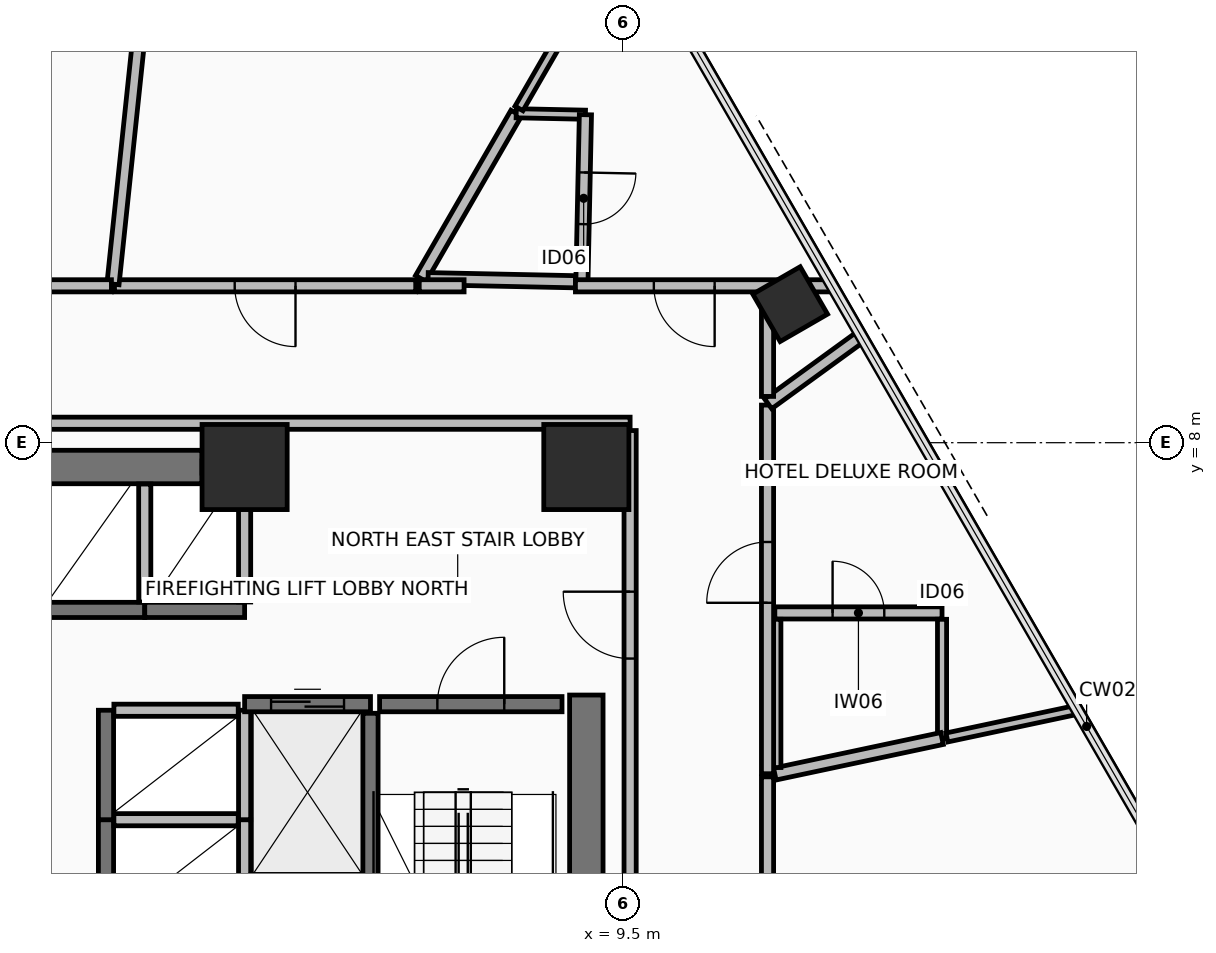
"""IFC4 building model, lengths in metres.
Left out: names, types, materials, properties, quantities, classifications, styles, units other than length and angle.
Written with IfcOpenShell. Run it as: python <this file> out.ifc"""

import sys

from ifc_helpers import new_model, si_unit, direction, frame, frame_2d, origin, origin_2d, place, context, subcontext, project, spatial, rectangle, hollow_rectangle, extrude, element, fill, save


model = new_model("IFC4")
c1 = context("Model", 3, precision=1e-05, world=origin(), true_north=direction((0.0, 1.0)))
c2 = subcontext(c1, "Body", "Model", "MODEL_VIEW")
j1 = project(units=[si_unit("LENGTHUNIT", "METRE"), si_unit("PLANEANGLEUNIT", "RADIAN")], contexts=[c1])
p1 = place(None, origin())
s1 = spatial("IfcSite", under=j1, at=p1, CompositionType="ELEMENT")
p2 = place(p1, origin())
s2 = spatial("IfcBuilding", under=s1, at=p2, CompositionType="ELEMENT")
p3 = place(p2, frame((0.0, 0.0, 35.25)))
s3 = spatial("IfcBuildingStorey", under=s2, at=p3, CompositionType="ELEMENT", Elevation=35.25)
for number, where, z_axis, x_axis in (
    (1, (8.9, 7.6, 0.0), (0.0, 0.0, 1.0), (1.0, 0.0, 0.0)),
    (2, (3.28, 7.6, 0.0), (0.0, 0.0, 1.0), (1.0, 0.0, 0.0)),
):
    element("IfcColumn", number, at=place(p3, frame(where, z_axis=z_axis, x_axis=x_axis)), inside=s3, PredefinedType="COLUMN", context=c2, shape_type="SweptSolid", body=[
        extrude(rectangle(XDim=1.4, YDim=1.4, at=origin_2d()), origin(), (0.0, 0.0, 1.0), 3.4),
    ])
p4 = place(p3, frame((12.252, 10.279, 0.0), z_axis=(0.0, 0.0, 1.0), x_axis=(-0.500001511499, 0.866024531118, 0.0)))
e3 = element("IfcColumn", 3, at=p4, inside=s3, PredefinedType="COLUMN", context=c2, shape_type="SweptSolid", body=[
    extrude(hollow_rectangle(XDim=0.9, YDim=0.9, WallThickness=0.05, at=origin_2d()), origin(), (0.0, 0.0, 1.0), 3.4),
])
p5 = place(p3, frame((-2.8, 7.6, 0.0), z_axis=(0.0, 0.0, 1.0), x_axis=(1.0, 0.0, 0.0)))
e4 = element("IfcWall", 4, at=p5, inside=s3, PredefinedType="SHEAR", context=c2, shape_type="SweptSolid", body=[
    extrude(rectangle(XDim=5.38, YDim=0.55, at=frame_2d((2.69, 0.0))), origin(), (0.0, 0.0, 1.0), 3.225),
])
p6 = place(p3, frame((8.9, -6.85, 0.0), z_axis=(0.0, 0.0, 1.0), x_axis=(0.0, 1.0, 0.0)))
e5 = element("IfcWall", 5, at=p6, inside=s3, PredefinedType="SHEAR", context=c2, shape_type="SweptSolid", body=[
    extrude(rectangle(XDim=10.7, YDim=0.55, at=frame_2d((5.35, 0.0))), origin(), (0.0, 0.0, 1.0), 3.225),
])
p7 = place(p3, frame((9.62, 8.32, 0.0), z_axis=(0.0, 0.0, 1.0), x_axis=(-1.0, 0.0, 0.0)))
e6 = element("IfcWall", 6, at=p7, inside=s3, PredefinedType="PARTITIONING", context=c2, shape_type="SweptSolid", body=[
    extrude(rectangle(XDim=19.24, YDim=0.2, at=frame_2d((9.62, 0.0))), origin(), (0.0, 0.0, 1.0), 2.57),
])
p8 = place(p7, frame((14.22, 0.0, 0.0)))
e7 = element("IfcOpeningElement", 7, at=p8, cuts=e6, PredefinedType="OPENING", context=c2, shape_type="SweptSolid", body=[
    extrude(rectangle(XDim=0.9, YDim=2.1, at=frame_2d((0.45, 1.05))), frame((0.0, 0.11, 0.0), z_axis=(0.0, -1.0, 0.0), x_axis=(1.0, 0.0, 0.0)), (0.0, 0.0, 1.0), 0.22),
])
p9 = place(p3, frame((9.62, -8.2, 0.0), z_axis=(0.0, 0.0, 1.0), x_axis=(0.0, 1.0, 0.0)))
e8 = element("IfcWall", 8, at=p9, inside=s3, PredefinedType="PARTITIONING", context=c2, shape_type="SweptSolid", body=[
    extrude(rectangle(XDim=16.4, YDim=0.2, at=frame_2d((8.2, 0.0))), origin(), (0.0, 0.0, 1.0), 2.62),
])
p10 = place(p9, frame((12.65, 0.0, 0.0)))
e9 = element("IfcOpeningElement", 9, at=p10, cuts=e8, PredefinedType="OPENING", context=c2, shape_type="SweptSolid", body=[
    extrude(rectangle(XDim=1.1, YDim=2.15, at=frame_2d((0.55, 1.075))), frame((0.0, 0.11, 0.0), z_axis=(0.0, -1.0, 0.0), x_axis=(1.0, 0.0, 0.0)), (0.0, 0.0, 1.0), 0.22),
])
p11 = place(p3, frame((5.35, -3.75, 0.0), z_axis=(0.0, 0.0, 1.0), x_axis=(0.0, 1.0, 0.0)))
e10 = element("IfcWall", 10, at=p11, inside=s3, PredefinedType="SHEAR", context=c2, shape_type="SweptSolid", body=[
    extrude(rectangle(XDim=7.3, YDim=0.25, at=frame_2d((3.65, 0.0))), origin(), (0.0, 0.0, 1.0), 3.225),
])
p12 = place(p3, frame((5.5, 3.7, 0.0), z_axis=(0.0, 0.0, 1.0), x_axis=(1.0, 0.0, 0.0)))
e11 = element("IfcWall", 11, at=p12, inside=s3, PredefinedType="SHEAR", context=c2, shape_type="SweptSolid", body=[
    extrude(rectangle(XDim=3.0, YDim=0.25, at=frame_2d((1.5, 0.0))), origin(), (0.0, 0.0, 1.0), 3.225),
])
p13 = place(p12, frame((0.95, 0.0, 0.0)))
e12 = element("IfcOpeningElement", 12, at=p13, cuts=e11, PredefinedType="OPENING", context=c2, shape_type="SweptSolid", body=[
    extrude(rectangle(XDim=1.1, YDim=2.15, at=frame_2d((0.55, 1.075))), frame((0.0, 0.135, 0.0), z_axis=(0.0, -1.0, 0.0), x_axis=(1.0, 0.0, 0.0)), (0.0, 0.0, 1.0), 0.27),
])
p14 = place(p3, frame((-0.075, 5.25, 0.0), z_axis=(0.0, 0.0, 1.0), x_axis=(1.0, 0.0, 0.0)))
e13 = element("IfcWall", 13, at=p14, inside=s3, PredefinedType="SHEAR", context=c2, shape_type="SweptSolid", body=[
    extrude(rectangle(XDim=1.712, YDim=0.25, at=frame_2d((0.856, 0.0))), origin(), (0.0, 0.0, 1.0), 3.225),
])
p15 = place(p3, frame((1.637, 5.38, 0.0), z_axis=(0.0, 0.0, 1.0), x_axis=(0.0, 1.0, 0.0)))
e14 = element("IfcWall", 14, at=p15, inside=s3, PredefinedType="PARTITIONING", context=c2, shape_type="SweptSolid", body=[
    extrude(rectangle(XDim=1.94, YDim=0.2, at=frame_2d((0.97, 0.0))), origin(), (0.0, 0.0, 1.0), 3.225),
])
p16 = place(p3, frame((1.637, 5.25, 0.0), z_axis=(0.0, 0.0, 1.0), x_axis=(1.0, 0.0, 0.0)))
e15 = element("IfcWall", 15, at=p16, inside=s3, PredefinedType="SHEAR", context=c2, shape_type="SweptSolid", body=[
    extrude(rectangle(XDim=1.643, YDim=0.25, at=frame_2d((0.821, 0.0))), origin(), (0.0, 0.0, 1.0), 3.225),
])
p17 = place(p3, frame((2.58, 7.6, 0.0), z_axis=(0.0, 0.0, 1.0), x_axis=(1.0, 0.0, 0.0)))
e16 = element("IfcWall", 16, at=p17, inside=s3, PredefinedType="PARTITIONING", context=c2, shape_type="SweptSolid", body=[
    extrude(rectangle(XDim=0.7, YDim=0.2, at=frame_2d((0.35, 0.0))), origin(), (0.0, 0.0, 1.0), 2.42),
])
p18 = place(p3, frame((3.28, 5.38, 0.0), z_axis=(0.0, 0.0, 1.0), x_axis=(0.0, 1.0, 0.0)))
e17 = element("IfcWall", 17, at=p18, inside=s3, PredefinedType="PARTITIONING", context=c2, shape_type="SweptSolid", body=[
    extrude(rectangle(XDim=2.115, YDim=0.2, at=frame_2d((1.058, 0.0))), origin(), (0.0, 0.0, 1.0), 2.42),
])
p19 = place(p3, frame((1.0, 0.0, 0.0), z_axis=(0.0, 0.0, 1.0), x_axis=(0.0, 1.0, 0.0)))
e18 = element("IfcWall", 18, at=p19, inside=s3, PredefinedType="SHEAR", context=c2, shape_type="SweptSolid", body=[
    extrude(rectangle(XDim=1.8, YDim=0.25, at=frame_2d((0.9, 0.0))), origin(), (0.0, 0.0, 1.0), 3.225),
])
p20 = place(p3, frame((3.28, 0.0, 0.0), z_axis=(0.0, 0.0, 1.0), x_axis=(0.0, 1.0, 0.0)))
e19 = element("IfcWall", 19, at=p20, inside=s3, PredefinedType="PARTITIONING", context=c2, shape_type="SweptSolid", body=[
    extrude(rectangle(XDim=1.8, YDim=0.2, at=frame_2d((0.9, 0.0))), origin(), (0.0, 0.0, 1.0), 3.225),
])
p21 = place(p3, frame((1.13, 1.8, 0.0), z_axis=(0.0, 0.0, 1.0), x_axis=(1.0, 0.0, 0.0)))
e20 = element("IfcWall", 20, at=p21, inside=s3, PredefinedType="PARTITIONING", context=c2, shape_type="SweptSolid", body=[
    extrude(rectangle(XDim=2.045, YDim=0.2, at=frame_2d((1.022, 0.0))), origin(), (0.0, 0.0, 1.0), 3.225),
])
p22 = place(p3, frame((1.0, 1.8, 0.0), z_axis=(0.0, 0.0, 1.0), x_axis=(0.0, 1.0, 0.0)))
e21 = element("IfcWall", 21, at=p22, inside=s3, PredefinedType="SHEAR", context=c2, shape_type="SweptSolid", body=[
    extrude(rectangle(XDim=1.8, YDim=0.25, at=frame_2d((0.9, 0.0))), origin(), (0.0, 0.0, 1.0), 3.225),
])
p23 = place(p3, frame((3.28, 1.8, 0.0), z_axis=(0.0, 0.0, 1.0), x_axis=(0.0, 1.0, 0.0)))
e22 = element("IfcWall", 22, at=p23, inside=s3, PredefinedType="PARTITIONING", context=c2, shape_type="SweptSolid", body=[
    extrude(rectangle(XDim=1.8, YDim=0.2, at=frame_2d((0.9, 0.0))), origin(), (0.0, 0.0, 1.0), 3.225),
])
p24 = place(p3, frame((1.13, 3.6, 0.0), z_axis=(0.0, 0.0, 1.0), x_axis=(1.0, 0.0, 0.0)))
e23 = element("IfcWall", 23, at=p24, inside=s3, PredefinedType="PARTITIONING", context=c2, shape_type="SweptSolid", body=[
    extrude(rectangle(XDim=2.045, YDim=0.2, at=frame_2d((1.022, 0.0))), origin(), (0.0, 0.0, 1.0), 2.42),
])
p25 = place(p3, frame((3.28, 3.7, 0.0), z_axis=(0.0, 0.0, 1.0), x_axis=(1.0, 0.0, 0.0)))
e24 = element("IfcWall", 24, at=p25, inside=s3, PredefinedType="SHEAR", context=c2, shape_type="SweptSolid", body=[
    extrude(rectangle(XDim=2.07, YDim=0.25, at=frame_2d((1.035, 0.0))), origin(), (0.0, 0.0, 1.0), 3.225),
])
p26 = place(p25, frame((0.435, 0.0, 0.0)))
e25 = element("IfcOpeningElement", 25, at=p26, cuts=e24, PredefinedType="OPENING", context=c2, shape_type="SweptSolid", body=[
    extrude(rectangle(XDim=1.2, YDim=2.2, at=frame_2d((0.6, 1.1))), frame((0.0, 0.135, 0.0), z_axis=(0.0, -1.0, 0.0), x_axis=(1.0, 0.0, 0.0)), (0.0, 0.0, 1.0), 0.27),
])
p27 = place(p3, frame((12.0, 5.201, 0.0), z_axis=(0.0, 0.0, 1.0), x_axis=(1.0, 0.0, 0.0)))
e26 = element("IfcWall", 26, at=p27, inside=s3, PredefinedType="PARTITIONING", context=c2, shape_type="SweptSolid", body=[
    extrude(rectangle(XDim=2.75, YDim=0.2, at=frame_2d((1.375, 0.0))), origin(), (0.0, 0.0, 1.0), 2.82),
])
p28 = place(p27, frame((0.95, 0.0, 0.0)))
e27 = element("IfcOpeningElement", 27, at=p28, cuts=e26, PredefinedType="OPENING", context=c2, shape_type="SweptSolid", body=[
    extrude(rectangle(XDim=0.85, YDim=2.1, at=frame_2d((0.425, 1.05))), frame((0.0, 0.11, 0.0), z_axis=(0.0, -1.0, 0.0), x_axis=(1.0, 0.0, 0.0)), (0.0, 0.0, 1.0), 0.22),
])
p29 = place(p3, frame((14.75, 5.096, 0.0), z_axis=(0.0, 0.0, 1.0), x_axis=(0.0, -1.0, 0.0)))
e28 = element("IfcWall", 28, at=p29, inside=s3, PredefinedType="PARTITIONING", context=c2, shape_type="SweptSolid", body=[
    extrude(rectangle(XDim=1.96, YDim=0.15, at=frame_2d((0.98, 0.0))), origin(), (0.0, 0.0, 1.0), 3.225),
])
p30 = place(p3, frame((14.75, 3.135, 0.0), z_axis=(0.0, 0.0, 1.0), x_axis=(-0.978151787969, -0.207891990447, 0.0)))
e29 = element("IfcWall", 29, at=p30, inside=s3, PredefinedType="PARTITIONING", context=c2, shape_type="SweptSolid", body=[
    extrude(rectangle(XDim=2.812, YDim=0.2, at=frame_2d((1.406, 0.0))), origin(), (0.0, 0.0, 1.0), 2.82),
])
p31 = place(p3, frame((12.0, 2.658, 0.0), z_axis=(0.0, 0.0, 1.0), x_axis=(0.0, 1.0, 0.0)))
e30 = element("IfcWall", 30, at=p31, inside=s3, PredefinedType="PARTITIONING", context=c2, shape_type="SweptSolid", body=[
    extrude(rectangle(XDim=2.438, YDim=0.2, at=frame_2d((1.219, 0.0))), origin(), (0.0, 0.0, 1.0), 2.82),
])
p32 = place(p3, frame((6.177, 10.7, 0.0), z_axis=(0.0, 0.0, 1.0), x_axis=(0.50003000113, 0.866008081931, 0.0)))
e31 = element("IfcWall", 31, at=p32, inside=s3, PredefinedType="PARTITIONING", context=c2, shape_type="SweptSolid", body=[
    extrude(rectangle(XDim=3.138, YDim=0.2, at=frame_2d((1.569, 0.0))), origin(), (0.0, 0.0, 1.0), 2.82),
])
p33 = place(p3, frame((7.747, 13.417, 0.0), z_axis=(0.0, 0.0, 1.0), x_axis=(0.999779226224, -0.02101187308, 0.0)))
e32 = element("IfcWall", 32, at=p33, inside=s3, PredefinedType="PARTITIONING", context=c2, shape_type="SweptSolid", body=[
    extrude(rectangle(XDim=1.139, YDim=0.15, at=frame_2d((0.569, 0.0))), origin(), (0.0, 0.0, 1.0), 2.82),
])
p34 = place(p3, frame((8.885, 13.394, 0.0), z_axis=(0.0, 0.0, 1.0), x_axis=(-0.021041428763, -0.99977860463, 0.0)))
e33 = element("IfcWall", 33, at=p34, inside=s3, PredefinedType="PARTITIONING", context=c2, shape_type="SweptSolid", body=[
    extrude(rectangle(XDim=2.75, YDim=0.2, at=frame_2d((1.375, 0.0))), origin(), (0.0, 0.0, 1.0), 2.82),
])
p35 = place(p34, frame((0.95, 0.0, 0.0)))
e34 = element("IfcOpeningElement", 34, at=p35, cuts=e33, PredefinedType="OPENING", context=c2, shape_type="SweptSolid", body=[
    extrude(rectangle(XDim=0.85, YDim=2.1, at=frame_2d((0.425, 1.05))), frame((0.0, 0.11, 0.0), z_axis=(0.0, -1.0, 0.0), x_axis=(1.0, 0.0, 0.0)), (0.0, 0.0, 1.0), 0.22),
])
p36 = place(p3, frame((8.722, 10.646, 0.0), z_axis=(0.0, 0.0, 1.0), x_axis=(-0.999778667622, 0.021038435515, 0.0)))
e35 = element("IfcWall", 35, at=p36, inside=s3, PredefinedType="PARTITIONING", context=c2, shape_type="SweptSolid", body=[
    extrude(rectangle(XDim=2.425, YDim=0.2, at=frame_2d((1.213, 0.0))), origin(), (0.0, 0.0, 1.0), 2.82),
])
p37 = place(p3, frame((16.97, 3.607, 0.0), z_axis=(0.0, 0.0, 1.0), x_axis=(-0.978131050842, -0.207989536706, 0.0)))
e36 = element("IfcWall", 36, at=p37, inside=s3, PredefinedType="PARTITIONING", context=c2, shape_type="SweptSolid", body=[
    extrude(rectangle(XDim=2.188, YDim=0.15, at=frame_2d((1.094, 0.0))), origin(), (0.0, 0.0, 1.0), 2.42),
])
p38 = place(p3, frame((11.88, 2.556, 0.0), z_axis=(0.0, 0.0, 1.0), x_axis=(0.0, 1.0, 0.0)))
e37 = element("IfcWall", 37, at=p38, inside=s3, PredefinedType="PARTITIONING", context=c2, shape_type="SweptSolid", body=[
    extrude(rectangle(XDim=6.063, YDim=0.2, at=frame_2d((3.031, 0.0))), origin(), (0.0, 0.0, 1.0), 2.82),
])
p39 = place(p38, frame((2.811, 0.0, 0.0)))
e38 = element("IfcOpeningElement", 38, at=p39, cuts=e37, PredefinedType="OPENING", context=c2, shape_type="SweptSolid", body=[
    extrude(rectangle(XDim=1.0, YDim=2.15, at=frame_2d((0.5, 1.075))), frame((0.0, 0.11, 0.0), z_axis=(0.0, -1.0, 0.0), x_axis=(1.0, 0.0, 0.0)), (0.0, 0.0, 1.0), 0.22),
])
p40 = place(p3, frame((11.89, 8.639, 0.0), z_axis=(0.0, 0.0, 1.0), x_axis=(0.80903021321, 0.587767057697, 0.0)))
e39 = element("IfcWall", 39, at=p40, inside=s3, PredefinedType="PARTITIONING", context=c2, shape_type="SweptSolid", body=[
    extrude(rectangle(XDim=1.866, YDim=0.2, at=frame_2d((0.933, 0.0))), origin(), (0.0, 0.0, 1.0), 2.42),
])
p41 = place(p3, frame((12.944, 10.58, 0.0), z_axis=(0.0, 0.0, 1.0), x_axis=(-1.0, 0.0, 0.0)))
e40 = element("IfcWall", 40, at=p41, inside=s3, PredefinedType="PARTITIONING", context=c2, shape_type="SweptSolid", body=[
    extrude(rectangle(XDim=4.223, YDim=0.2, at=frame_2d((2.112, 0.0))), origin(), (0.0, 0.0, 1.0), 2.42),
])
p42 = place(p41, frame((1.934, 0.0, 0.0)))
e41 = element("IfcOpeningElement", 41, at=p42, cuts=e40, PredefinedType="OPENING", context=c2, shape_type="SweptSolid", body=[
    extrude(rectangle(XDim=1.0, YDim=2.15, at=frame_2d((0.5, 1.075))), frame((0.0, 0.11, 0.0), z_axis=(0.0, -1.0, 0.0), x_axis=(1.0, 0.0, 0.0)), (0.0, 0.0, 1.0), 0.22),
])
p43 = place(p3, frame((6.889, 10.58, 0.0), z_axis=(0.0, 0.0, 1.0), x_axis=(-1.0, 0.0, 0.0)))
e42 = element("IfcWall", 42, at=p43, inside=s3, PredefinedType="PARTITIONING", context=c2, shape_type="SweptSolid", body=[
    extrude(rectangle(XDim=0.738, YDim=0.2, at=frame_2d((0.369, 0.0))), origin(), (0.0, 0.0, 1.0), 3.225),
])
p44 = place(p3, frame((7.792, 13.497, 0.0), z_axis=(0.0, 0.0, 1.0), x_axis=(0.500023071514, 0.86601208303, 0.0)))
e43 = element("IfcWall", 43, at=p44, inside=s3, PredefinedType="PARTITIONING", context=c2, shape_type="SweptSolid", body=[
    extrude(rectangle(XDim=3.468, YDim=0.15, at=frame_2d((1.734, 0.0))), origin(), (0.0, 0.0, 1.0), 2.42),
])
p45 = place(p3, frame((11.88, 8.761, 0.0), z_axis=(0.0, 0.0, 1.0), x_axis=(0.0, 1.0, 0.0)))
e44 = element("IfcWall", 44, at=p45, inside=s3, PredefinedType="PARTITIONING", context=c2, shape_type="SweptSolid", body=[
    extrude(rectangle(XDim=1.714, YDim=0.2, at=frame_2d((0.857, 0.0))), origin(), (0.0, 0.0, 1.0), 2.42),
])
p46 = place(p3, frame((6.094, 10.58, 0.0), z_axis=(0.0, 0.0, 1.0), x_axis=(-1.0, 0.0, 0.0)))
e45 = element("IfcWall", 45, at=p46, inside=s3, PredefinedType="PARTITIONING", context=c2, shape_type="SweptSolid", body=[
    extrude(rectangle(XDim=4.954, YDim=0.2, at=frame_2d((2.477, 0.0))), origin(), (0.0, 0.0, 1.0), 2.57),
])
p47 = place(p46, frame((1.977, 0.0, 0.0)))
e46 = element("IfcOpeningElement", 46, at=p47, cuts=e45, PredefinedType="OPENING", context=c2, shape_type="SweptSolid", body=[
    extrude(rectangle(XDim=1.0, YDim=2.15, at=frame_2d((0.5, 1.075))), frame((0.0, 0.11, 0.0), z_axis=(0.0, -1.0, 0.0), x_axis=(1.0, 0.0, 0.0)), (0.0, 0.0, 1.0), 0.22),
])
p48 = place(p3, frame((1.115, 10.608, 0.0), z_axis=(0.0, 0.0, 1.0), x_axis=(0.1045337987, 0.994521334577, 0.0)))
e47 = element("IfcWall", 47, at=p48, inside=s3, PredefinedType="PARTITIONING", context=c2, shape_type="SweptSolid", body=[
    extrude(rectangle(XDim=6.313, YDim=0.2, at=frame_2d((3.156, 0.0))), origin(), (0.0, 0.0, 1.0), 2.57),
])
p49 = place(p3, frame((1.09, 10.58, 0.0), z_axis=(0.0, 0.0, 1.0), x_axis=(-1.0, 0.0, 0.0)))
e48 = element("IfcWall", 48, at=p49, inside=s3, PredefinedType="PARTITIONING", context=c2, shape_type="SweptSolid", body=[
    extrude(rectangle(XDim=4.923, YDim=0.2, at=frame_2d((2.461, 0.0))), origin(), (0.0, 0.0, 1.0), 3.225),
])
p50 = place(p49, frame((1.861, 0.0, 0.0)))
e49 = element("IfcOpeningElement", 49, at=p50, cuts=e48, PredefinedType="OPENING", context=c2, shape_type="SweptSolid", body=[
    extrude(rectangle(XDim=1.2, YDim=2.15, at=frame_2d((0.6, 1.075))), frame((0.0, 0.11, 0.0), z_axis=(0.0, -1.0, 0.0), x_axis=(1.0, 0.0, 0.0)), (0.0, 0.0, 1.0), 0.22),
])
p51 = place(p3, frame((11.88, -2.074, 0.0), z_axis=(0.0, 0.0, 1.0), x_axis=(0.0, 1.0, 0.0)))
e50 = element("IfcWall", 50, at=p51, inside=s3, PredefinedType="PARTITIONING", context=c2, shape_type="SweptSolid", body=[
    extrude(rectangle(XDim=4.579, YDim=0.2, at=frame_2d((2.289, 0.0))), origin(), (0.0, 0.0, 1.0), 3.225),
])
p52 = place(p51, frame((1.839, 0.0, 0.0)))
e51 = element("IfcOpeningElement", 51, at=p52, cuts=e50, PredefinedType="OPENING", context=c2, shape_type="SweptSolid", body=[
    extrude(rectangle(XDim=0.9, YDim=2.1, at=frame_2d((0.45, 1.05))), frame((0.0, 0.11, 0.0), z_axis=(0.0, -1.0, 0.0), x_axis=(1.0, 0.0, 0.0)), (0.0, 0.0, 1.0), 0.22),
])
p53 = place(p10, frame((1.1, 0.0, 0.0), z_axis=(0.0, 0.0, 1.0), x_axis=(-1.0, 0.0, 0.0)))
e52 = element("IfcDoor", 52, at=p53, inside=s3, OperationType="SINGLE_SWING_LEFT", PredefinedType="DOOR", context=c2, shape_type="SweptSolid", body=[
    extrude(rectangle(XDim=1.1, YDim=2.15, at=frame_2d((0.55, 1.075))), frame((0.0, 0.025, 0.0), z_axis=(0.0, -1.0, 0.0), x_axis=(1.0, 0.0, 0.0)), (0.0, 0.0, 1.0), 0.05),
])
fill(e9, e52)
p54 = place(p13, frame((1.1, 0.0, 0.0), z_axis=(0.0, 0.0, 1.0), x_axis=(-1.0, 0.0, 0.0)))
e53 = element("IfcDoor", 53, at=p54, inside=s3, OperationType="SINGLE_SWING_LEFT", PredefinedType="DOOR", context=c2, shape_type="SweptSolid", body=[
    extrude(rectangle(XDim=1.1, YDim=2.15, at=frame_2d((0.55, 1.075))), frame((0.0, 0.025, 0.0), z_axis=(0.0, -1.0, 0.0), x_axis=(1.0, 0.0, 0.0)), (0.0, 0.0, 1.0), 0.05),
])
fill(e12, e53)
p55 = place(p26, origin())
e54 = element("IfcDoor", 54, at=p55, inside=s3, OperationType="SLIDING_TO_RIGHT", PredefinedType="DOOR", context=c2, shape_type="SweptSolid", body=[
    extrude(rectangle(XDim=1.2, YDim=2.2, at=frame_2d((0.6, 1.1))), frame((0.0, 0.025, 0.0), z_axis=(0.0, -1.0, 0.0), x_axis=(1.0, 0.0, 0.0)), (0.0, 0.0, 1.0), 0.05),
])
fill(e25, e54)
p56 = place(p28, origin())
e55 = element("IfcDoor", 55, at=p56, inside=s3, OperationType="SINGLE_SWING_RIGHT", PredefinedType="DOOR", context=c2, shape_type="SweptSolid", body=[
    extrude(rectangle(XDim=0.85, YDim=2.1, at=frame_2d((0.425, 1.05))), frame((0.0, 0.025, 0.0), z_axis=(0.0, -1.0, 0.0), x_axis=(1.0, 0.0, 0.0)), (0.0, 0.0, 1.0), 0.05),
])
fill(e27, e55)
p57 = place(p35, origin())
e56 = element("IfcDoor", 56, at=p57, inside=s3, OperationType="SINGLE_SWING_RIGHT", PredefinedType="DOOR", context=c2, shape_type="SweptSolid", body=[
    extrude(rectangle(XDim=0.85, YDim=2.1, at=frame_2d((0.425, 1.05))), frame((0.0, 0.025, 0.0), z_axis=(0.0, -1.0, 0.0), x_axis=(1.0, 0.0, 0.0)), (0.0, 0.0, 1.0), 0.05),
])
fill(e34, e56)
p58 = place(p39, origin())
e57 = element("IfcDoor", 57, at=p58, inside=s3, OperationType="SINGLE_SWING_LEFT", PredefinedType="DOOR", context=c2, shape_type="SweptSolid", body=[
    extrude(rectangle(XDim=1.0, YDim=2.15, at=frame_2d((0.5, 1.075))), frame((0.0, 0.025, 0.0), z_axis=(0.0, -1.0, 0.0), x_axis=(1.0, 0.0, 0.0)), (0.0, 0.0, 1.0), 0.05),
])
fill(e38, e57)
p59 = place(p42, origin())
e58 = element("IfcDoor", 58, at=p59, inside=s3, OperationType="SINGLE_SWING_LEFT", PredefinedType="DOOR", context=c2, shape_type="SweptSolid", body=[
    extrude(rectangle(XDim=1.0, YDim=2.15, at=frame_2d((0.5, 1.075))), frame((0.0, 0.025, 0.0), z_axis=(0.0, -1.0, 0.0), x_axis=(1.0, 0.0, 0.0)), (0.0, 0.0, 1.0), 0.05),
])
fill(e41, e58)
p60 = place(p47, origin())
e59 = element("IfcDoor", 59, at=p60, inside=s3, OperationType="SINGLE_SWING_LEFT", PredefinedType="DOOR", context=c2, shape_type="SweptSolid", body=[
    extrude(rectangle(XDim=1.0, YDim=2.15, at=frame_2d((0.5, 1.075))), frame((0.0, 0.025, 0.0), z_axis=(0.0, -1.0, 0.0), x_axis=(1.0, 0.0, 0.0)), (0.0, 0.0, 1.0), 0.05),
])
fill(e46, e59)
save(model, sys.argv[1])
